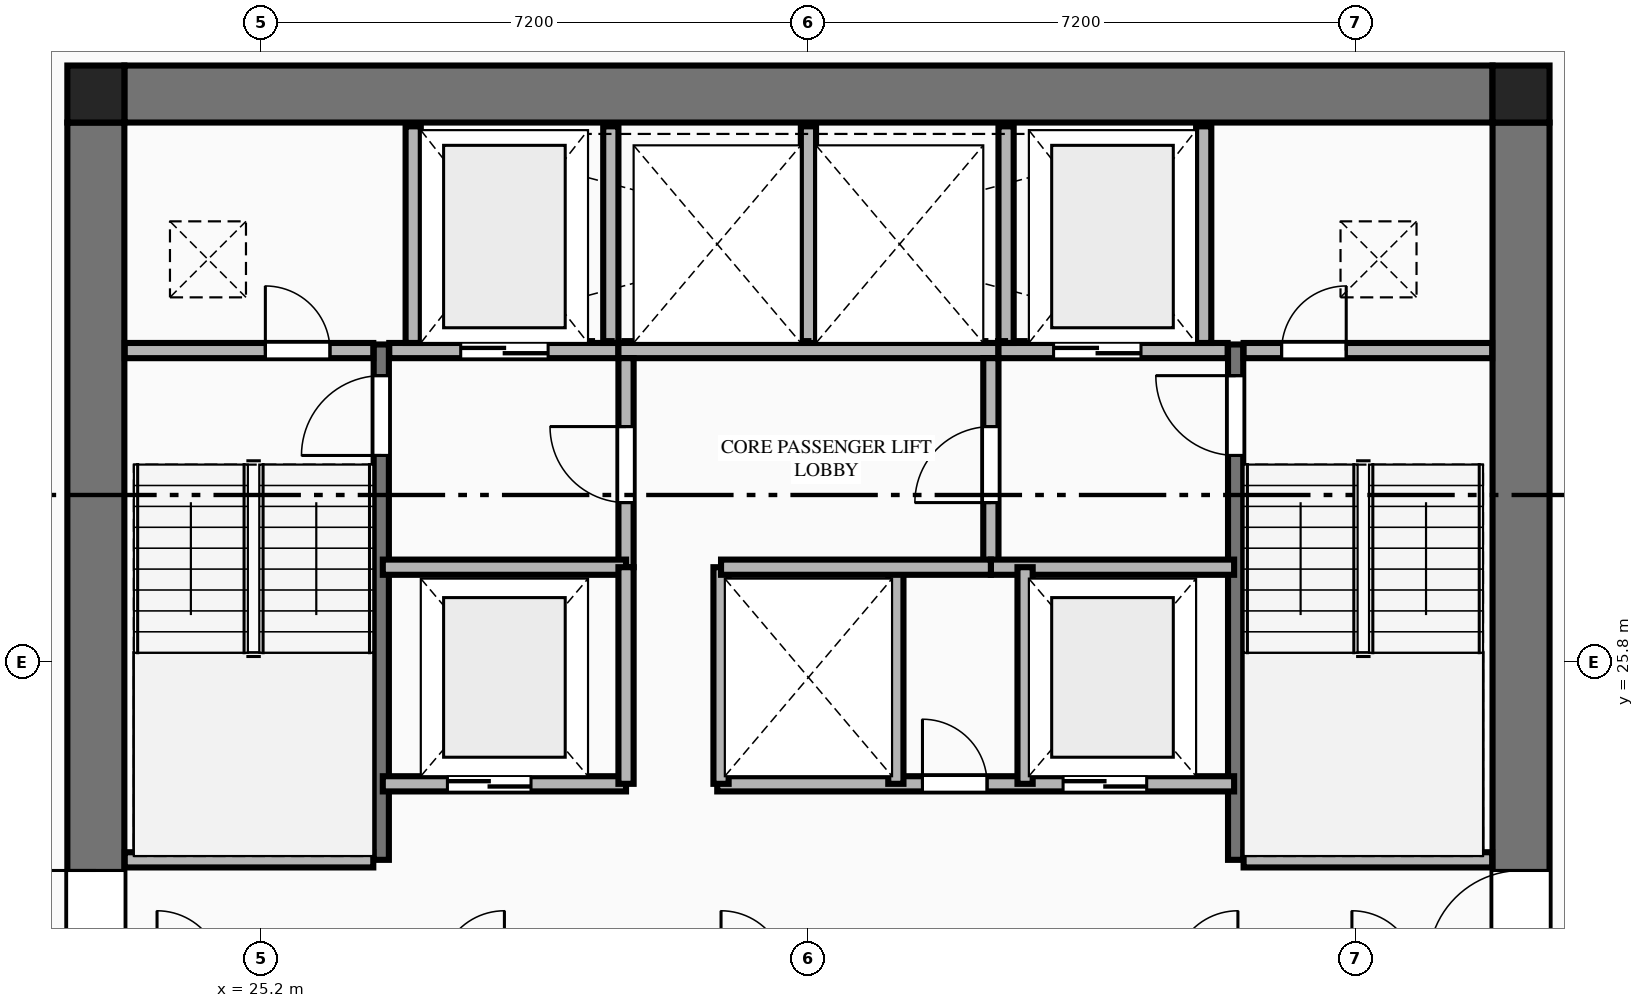
"""IFC4 building model, lengths in metres.
Left out: names, types, materials, properties, quantities, classifications, styles, units other than length and angle.
Written with IfcOpenShell. Run it as: python <this file> out.ifc"""

import sys

from ifc_helpers import new_model, si_unit, direction, frame, frame_2d, origin, origin_2d, place, context, subcontext, project, spatial, rectangle, extrude, element, fill, save


model = new_model("IFC4")
c1 = context("Model", 3, precision=1e-05, world=origin(), true_north=direction((0.0, 1.0)))
c2 = subcontext(c1, "Body", "Model", "MODEL_VIEW")
j1 = project(units=[si_unit("LENGTHUNIT", "METRE"), si_unit("PLANEANGLEUNIT", "RADIAN")], contexts=[c1])
p1 = place(None, origin())
s1 = spatial("IfcSite", under=j1, at=p1, CompositionType="ELEMENT")
p2 = place(p1, origin())
s2 = spatial("IfcBuilding", under=s1, at=p2, CompositionType="ELEMENT")
p3 = place(p2, frame((0.0, 0.0, 141.0)))
s3 = spatial("IfcBuildingStorey", under=s2, at=p3, CompositionType="ELEMENT", Elevation=141.0)
for number, where, z_axis, x_axis in (
    (1, (41.775, 33.275, 0.0), (0.0, 0.0, 1.0), (1.0, 0.0, 0.0)),
    (2, (23.025, 33.275, 0.0), (0.0, 0.0, 1.0), (1.0, 0.0, 0.0)),
):
    element("IfcColumn", number, at=place(p3, frame(where, z_axis=z_axis, x_axis=x_axis)), inside=s3, PredefinedType="COLUMN", context=c2, shape_type="SweptSolid", body=[
        extrude(rectangle(XDim=0.75, YDim=0.75, at=origin_2d()), origin(), (0.0, 0.0, 1.0), 3.55),
    ])
p4 = place(p3, frame((23.4, 33.275, 0.0), z_axis=(0.0, 0.0, 1.0), x_axis=(1.0, 0.0, 0.0)))
e3 = element("IfcWall", 3, at=p4, inside=s3, PredefinedType="SHEAR", context=c2, shape_type="SweptSolid", body=[
    extrude(rectangle(XDim=18.0, YDim=0.75, at=frame_2d((9.0, 0.0))), origin(), (0.0, 0.0, 1.0), 3.34),
])
p5 = place(p3, frame((23.025, 18.9, 0.0), z_axis=(0.0, 0.0, 1.0), x_axis=(0.0, 1.0, 0.0)))
e4 = element("IfcWall", 4, at=p5, inside=s3, PredefinedType="SHEAR", context=c2, shape_type="SweptSolid", body=[
    extrude(rectangle(XDim=14.0, YDim=0.75, at=frame_2d((7.0, 0.0))), origin(), (0.0, 0.0, 1.0), 3.34),
])
p6 = place(p5, frame((2.94, 0.0, 0.0)))
e5 = element("IfcOpeningElement", 5, at=p6, cuts=e4, PredefinedType="OPENING", context=c2, shape_type="SweptSolid", body=[
    extrude(rectangle(XDim=1.22, YDim=2.25, at=frame_2d((0.61, 1.125))), frame((0.0, 0.385, 0.0), z_axis=(0.0, -1.0, 0.0), x_axis=(1.0, 0.0, 0.0)), (0.0, 0.0, 1.0), 0.77),
])
p7 = place(p3, frame((41.775, 18.9, 0.0), z_axis=(0.0, 0.0, 1.0), x_axis=(0.0, 1.0, 0.0)))
e6 = element("IfcWall", 6, at=p7, inside=s3, PredefinedType="SHEAR", context=c2, shape_type="SweptSolid", body=[
    extrude(rectangle(XDim=14.0, YDim=0.75, at=frame_2d((7.0, 0.0))), origin(), (0.0, 0.0, 1.0), 3.34),
])
p8 = place(p7, frame((2.94, 0.0, 0.0)))
e7 = element("IfcOpeningElement", 7, at=p8, cuts=e6, PredefinedType="OPENING", context=c2, shape_type="SweptSolid", body=[
    extrude(rectangle(XDim=1.22, YDim=2.25, at=frame_2d((0.61, 1.125))), frame((0.0, 0.385, 0.0), z_axis=(0.0, -1.0, 0.0), x_axis=(1.0, 0.0, 0.0)), (0.0, 0.0, 1.0), 0.77),
])
p9 = place(p3, frame((26.78, 23.2, 0.0), z_axis=(0.0, 0.0, 1.0), x_axis=(0.0, 1.0, 0.0)))
e8 = element("IfcWall", 8, at=p9, inside=s3, PredefinedType="SHEAR", context=c2, shape_type="SweptSolid", body=[
    extrude(rectangle(XDim=6.78, YDim=0.2, at=frame_2d((3.39, 0.0))), origin(), (0.0, 0.0, 1.0), 3.55),
])
p10 = place(p9, frame((5.32, 0.0, 0.0)))
e9 = element("IfcOpeningElement", 9, at=p10, cuts=e8, PredefinedType="OPENING", context=c2, shape_type="SweptSolid", body=[
    extrude(rectangle(XDim=1.05, YDim=2.15, at=frame_2d((0.525, 1.075))), frame((0.0, 0.11, 0.0), z_axis=(0.0, -1.0, 0.0), x_axis=(1.0, 0.0, 0.0)), (0.0, 0.0, 1.0), 0.22),
])
p11 = place(p3, frame((23.405, 23.2, 0.0), z_axis=(0.0, 0.0, 1.0), x_axis=(1.0, 0.0, 0.0)))
e10 = element("IfcWall", 10, at=p11, inside=s3, PredefinedType="PLUMBINGWALL", context=c2, shape_type="SweptSolid", body=[
    extrude(rectangle(XDim=3.27, YDim=0.2, at=frame_2d((1.635, 0.0))), origin(), (0.0, 0.0, 1.0), 3.34),
])
p12 = place(p3, frame((38.02, 23.2, 0.0), z_axis=(0.0, 0.0, 1.0), x_axis=(0.0, 1.0, 0.0)))
e11 = element("IfcWall", 11, at=p12, inside=s3, PredefinedType="SHEAR", context=c2, shape_type="SweptSolid", body=[
    extrude(rectangle(XDim=6.78, YDim=0.2, at=frame_2d((3.39, 0.0))), origin(), (0.0, 0.0, 1.0), 3.55),
])
p13 = place(p12, frame((5.32, 0.0, 0.0)))
e12 = element("IfcOpeningElement", 12, at=p13, cuts=e11, PredefinedType="OPENING", context=c2, shape_type="SweptSolid", body=[
    extrude(rectangle(XDim=1.05, YDim=2.15, at=frame_2d((0.525, 1.075))), frame((0.0, 0.11, 0.0), z_axis=(0.0, -1.0, 0.0), x_axis=(1.0, 0.0, 0.0)), (0.0, 0.0, 1.0), 0.22),
])
p14 = place(p3, frame((38.125, 23.2, 0.0), z_axis=(0.0, 0.0, 1.0), x_axis=(1.0, 0.0, 0.0)))
e13 = element("IfcWall", 13, at=p14, inside=s3, PredefinedType="PLUMBINGWALL", context=c2, shape_type="SweptSolid", body=[
    extrude(rectangle(XDim=3.27, YDim=0.2, at=frame_2d((1.635, 0.0))), origin(), (0.0, 0.0, 1.0), 3.34),
])
p15 = place(p3, frame((23.405, 29.9, 0.0), z_axis=(0.0, 0.0, 1.0), x_axis=(1.0, 0.0, 0.0)))
e14 = element("IfcWall", 14, at=p15, inside=s3, PredefinedType="PLUMBINGWALL", context=c2, shape_type="SweptSolid", body=[
    extrude(rectangle(XDim=3.27, YDim=0.2, at=frame_2d((1.635, 0.0))), origin(), (0.0, 0.0, 1.0), 3.34),
])
p16 = place(p15, frame((1.85, 0.0, 0.0)))
e15 = element("IfcOpeningElement", 15, at=p16, cuts=e14, PredefinedType="OPENING", context=c2, shape_type="SweptSolid", body=[
    extrude(rectangle(XDim=0.85, YDim=2.05, at=frame_2d((0.425, 1.025))), frame((0.0, 0.11, 0.0), z_axis=(0.0, -1.0, 0.0), x_axis=(1.0, 0.0, 0.0)), (0.0, 0.0, 1.0), 0.22),
])
p17 = place(p3, frame((26.885, 29.9, 0.0), z_axis=(0.0, 0.0, 1.0), x_axis=(1.0, 0.0, 0.0)))
e16 = element("IfcWall", 16, at=p17, inside=s3, PredefinedType="PLUMBINGWALL", context=c2, shape_type="SweptSolid", body=[
    extrude(rectangle(XDim=3.015, YDim=0.2, at=frame_2d((1.507, 0.0))), origin(), (0.0, 0.0, 1.0), 3.34),
])
p18 = place(p17, frame((0.94, 0.0, 0.0)))
e17 = element("IfcOpeningElement", 17, at=p18, cuts=e16, PredefinedType="OPENING", context=c2, shape_type="SweptSolid", body=[
    extrude(rectangle(XDim=1.15, YDim=2.2, at=frame_2d((0.575, 1.1))), frame((0.0, 0.11, 0.0), z_axis=(0.0, -1.0, 0.0), x_axis=(1.0, 0.0, 0.0)), (0.0, 0.0, 1.0), 0.22),
])
p19 = place(p3, frame((29.9, 29.9, 0.0), z_axis=(0.0, 0.0, 1.0), x_axis=(1.0, 0.0, 0.0)))
e18 = element("IfcWall", 18, at=p19, inside=s3, PredefinedType="PLUMBINGWALL", context=c2, shape_type="SweptSolid", body=[
    extrude(rectangle(XDim=5.0, YDim=0.2, at=frame_2d((2.5, 0.0))), origin(), (0.0, 0.0, 1.0), 3.34),
])
p20 = place(p3, frame((34.9, 29.9, 0.0), z_axis=(0.0, 0.0, 1.0), x_axis=(1.0, 0.0, 0.0)))
e19 = element("IfcWall", 19, at=p20, inside=s3, PredefinedType="PLUMBINGWALL", context=c2, shape_type="SweptSolid", body=[
    extrude(rectangle(XDim=3.015, YDim=0.2, at=frame_2d((1.508, 0.0))), origin(), (0.0, 0.0, 1.0), 3.34),
])
p21 = place(p20, frame((0.725, 0.0, 0.0)))
e20 = element("IfcOpeningElement", 20, at=p21, cuts=e19, PredefinedType="OPENING", context=c2, shape_type="SweptSolid", body=[
    extrude(rectangle(XDim=1.15, YDim=2.2, at=frame_2d((0.575, 1.1))), frame((0.0, 0.11, 0.0), z_axis=(0.0, -1.0, 0.0), x_axis=(1.0, 0.0, 0.0)), (0.0, 0.0, 1.0), 0.22),
])
p22 = place(p3, frame((38.125, 29.9, 0.0), z_axis=(0.0, 0.0, 1.0), x_axis=(1.0, 0.0, 0.0)))
e21 = element("IfcWall", 21, at=p22, inside=s3, PredefinedType="PLUMBINGWALL", context=c2, shape_type="SweptSolid", body=[
    extrude(rectangle(XDim=3.27, YDim=0.2, at=frame_2d((1.635, 0.0))), origin(), (0.0, 0.0, 1.0), 3.34),
])
p23 = place(p22, frame((0.5, 0.0, 0.0)))
e22 = element("IfcOpeningElement", 22, at=p23, cuts=e21, PredefinedType="OPENING", context=c2, shape_type="SweptSolid", body=[
    extrude(rectangle(XDim=0.85, YDim=2.05, at=frame_2d((0.425, 1.025))), frame((0.0, 0.11, 0.0), z_axis=(0.0, -1.0, 0.0), x_axis=(1.0, 0.0, 0.0)), (0.0, 0.0, 1.0), 0.22),
])
for number, where, z_axis, x_axis in (
    (23, (27.2, 30.0, 0.0), (0.0, 0.0, 1.0), (0.0, 1.0, 0.0)),
    (24, (29.8, 30.0, 0.0), (0.0, 0.0, 1.0), (0.0, 1.0, 0.0)),
    (25, (32.4, 30.0, 0.0), (0.0, 0.0, 1.0), (0.0, 1.0, 0.0)),
    (26, (35.0, 30.0, 0.0), (0.0, 0.0, 1.0), (0.0, 1.0, 0.0)),
    (27, (37.6, 30.0, 0.0), (0.0, 0.0, 1.0), (0.0, 1.0, 0.0)),
):
    element("IfcWall", number, at=place(p3, frame(where, z_axis=z_axis, x_axis=x_axis)), inside=s3, PredefinedType="PLUMBINGWALL", context=c2, shape_type="SweptSolid", body=[
        extrude(rectangle(XDim=2.85, YDim=0.2, at=frame_2d((1.425, 0.0))), origin(), (0.0, 0.0, 1.0), 3.34),
    ])
p24 = place(p3, frame((30.0, 27.05, 0.0), z_axis=(0.0, 0.0, 1.0), x_axis=(0.0, 1.0, 0.0)))
e28 = element("IfcWall", 28, at=p24, inside=s3, PredefinedType="PLUMBINGWALL", context=c2, shape_type="SweptSolid", body=[
    extrude(rectangle(XDim=2.75, YDim=0.2, at=frame_2d((1.375, 0.0))), origin(), (0.0, 0.0, 1.0), 3.34),
])
p25 = place(p24, frame((0.85, 0.0, 0.0)))
e29 = element("IfcOpeningElement", 29, at=p25, cuts=e28, PredefinedType="OPENING", context=c2, shape_type="SweptSolid", body=[
    extrude(rectangle(XDim=1.0, YDim=2.15, at=frame_2d((0.5, 1.075))), frame((0.0, 0.11, 0.0), z_axis=(0.0, -1.0, 0.0), x_axis=(1.0, 0.0, 0.0)), (0.0, 0.0, 1.0), 0.22),
])
p26 = place(p3, frame((26.8, 27.05, 0.0), z_axis=(0.0, 0.0, 1.0), x_axis=(1.0, 0.0, 0.0)))
e30 = element("IfcWall", 30, at=p26, inside=s3, PredefinedType="PLUMBINGWALL", context=c2, shape_type="SweptSolid", body=[
    extrude(rectangle(XDim=3.2, YDim=0.2, at=frame_2d((1.6, 0.0))), origin(), (0.0, 0.0, 1.0), 3.34),
])
p27 = place(p3, frame((34.8, 27.05, 0.0), z_axis=(0.0, 0.0, 1.0), x_axis=(0.0, 1.0, 0.0)))
e31 = element("IfcWall", 31, at=p27, inside=s3, PredefinedType="PLUMBINGWALL", context=c2, shape_type="SweptSolid", body=[
    extrude(rectangle(XDim=2.75, YDim=0.2, at=frame_2d((1.375, 0.0))), origin(), (0.0, 0.0, 1.0), 3.34),
])
p28 = place(p27, frame((0.85, 0.0, 0.0)))
e32 = element("IfcOpeningElement", 32, at=p28, cuts=e31, PredefinedType="OPENING", context=c2, shape_type="SweptSolid", body=[
    extrude(rectangle(XDim=1.0, YDim=2.15, at=frame_2d((0.5, 1.075))), frame((0.0, 0.11, 0.0), z_axis=(0.0, -1.0, 0.0), x_axis=(1.0, 0.0, 0.0)), (0.0, 0.0, 1.0), 0.22),
])
p29 = place(p3, frame((34.8, 27.05, 0.0), z_axis=(0.0, 0.0, 1.0), x_axis=(1.0, 0.0, 0.0)))
e33 = element("IfcWall", 33, at=p29, inside=s3, PredefinedType="PLUMBINGWALL", context=c2, shape_type="SweptSolid", body=[
    extrude(rectangle(XDim=3.2, YDim=0.2, at=frame_2d((1.6, 0.0))), origin(), (0.0, 0.0, 1.0), 3.34),
])
p30 = place(p3, frame((26.8, 24.2, 0.0), z_axis=(0.0, 0.0, 1.0), x_axis=(1.0, 0.0, 0.0)))
e34 = element("IfcWall", 34, at=p30, inside=s3, PredefinedType="PLUMBINGWALL", context=c2, shape_type="SweptSolid", body=[
    extrude(rectangle(XDim=3.2, YDim=0.2, at=frame_2d((1.6, 0.0))), origin(), (0.0, 0.0, 1.0), 3.34),
])
p31 = place(p30, frame((0.85, 0.0, 0.0)))
e35 = element("IfcOpeningElement", 35, at=p31, cuts=e34, PredefinedType="OPENING", context=c2, shape_type="SweptSolid", body=[
    extrude(rectangle(XDim=1.1, YDim=2.2, at=frame_2d((0.55, 1.1))), frame((0.0, 0.11, 0.0), z_axis=(0.0, -1.0, 0.0), x_axis=(1.0, 0.0, 0.0)), (0.0, 0.0, 1.0), 0.22),
])
p32 = place(p3, frame((30.0, 24.2, 0.0), z_axis=(0.0, 0.0, 1.0), x_axis=(0.0, 1.0, 0.0)))
e36 = element("IfcWall", 36, at=p32, inside=s3, PredefinedType="PLUMBINGWALL", context=c2, shape_type="SweptSolid", body=[
    extrude(rectangle(XDim=2.85, YDim=0.2, at=frame_2d((1.425, 0.0))), origin(), (0.0, 0.0, 1.0), 3.34),
])
p33 = place(p3, frame((31.2, 24.2, 0.0), z_axis=(0.0, 0.0, 1.0), x_axis=(1.0, 0.0, 0.0)))
e37 = element("IfcWall", 37, at=p33, inside=s3, PredefinedType="PLUMBINGWALL", context=c2, shape_type="SweptSolid", body=[
    extrude(rectangle(XDim=6.8, YDim=0.2, at=frame_2d((3.4, 0.0))), origin(), (0.0, 0.0, 1.0), 3.34),
])
p34 = place(p33, frame((2.7, 0.0, 0.0)))
e38 = element("IfcOpeningElement", 38, at=p34, cuts=e37, PredefinedType="OPENING", context=c2, shape_type="SweptSolid", body=[
    extrude(rectangle(XDim=0.85, YDim=2.05, at=frame_2d((0.425, 1.025))), frame((0.0, 0.11, 0.0), z_axis=(0.0, -1.0, 0.0), x_axis=(1.0, 0.0, 0.0)), (0.0, 0.0, 1.0), 0.22),
])
p35 = place(p33, frame((4.55, 0.0, 0.0)))
e39 = element("IfcOpeningElement", 39, at=p35, cuts=e37, PredefinedType="OPENING", context=c2, shape_type="SweptSolid", body=[
    extrude(rectangle(XDim=1.1, YDim=2.2, at=frame_2d((0.55, 1.1))), frame((0.0, 0.11, 0.0), z_axis=(0.0, -1.0, 0.0), x_axis=(1.0, 0.0, 0.0)), (0.0, 0.0, 1.0), 0.22),
])
for number, where, z_axis, x_axis in (
    (40, (31.25, 24.2, 0.0), (0.0, 0.0, 1.0), (0.0, 1.0, 0.0)),
    (41, (33.55, 24.2, 0.0), (0.0, 0.0, 1.0), (0.0, 1.0, 0.0)),
    (42, (35.25, 24.2, 0.0), (0.0, 0.0, 1.0), (0.0, 1.0, 0.0)),
):
    element("IfcWall", number, at=place(p3, frame(where, z_axis=z_axis, x_axis=x_axis)), inside=s3, PredefinedType="PLUMBINGWALL", context=c2, shape_type="SweptSolid", body=[
        extrude(rectangle(XDim=2.85, YDim=0.2, at=frame_2d((1.425, 0.0))), origin(), (0.0, 0.0, 1.0), 3.34),
    ])
p36 = place(p3, frame((31.25, 27.05, 0.0), z_axis=(0.0, 0.0, 1.0), x_axis=(1.0, 0.0, 0.0)))
e43 = element("IfcWall", 43, at=p36, inside=s3, PredefinedType="PLUMBINGWALL", context=c2, shape_type="SweptSolid", body=[
    extrude(rectangle(XDim=3.55, YDim=0.2, at=frame_2d((1.775, 0.0))), origin(), (0.0, 0.0, 1.0), 3.34),
])
p37 = place(p6, origin())
e44 = element("IfcDoor", 44, at=p37, inside=s3, OperationType="SINGLE_SWING_RIGHT", PredefinedType="DOOR", context=c2, shape_type="SweptSolid", body=[
    extrude(rectangle(XDim=1.22, YDim=2.25, at=frame_2d((0.61, 1.125))), frame((0.0, 0.025, 0.0), z_axis=(0.0, -1.0, 0.0), x_axis=(1.0, 0.0, 0.0)), (0.0, 0.0, 1.0), 0.05),
])
fill(e5, e44)
p38 = place(p8, origin())
e45 = element("IfcDoor", 45, at=p38, inside=s3, OperationType="SINGLE_SWING_LEFT", PredefinedType="DOOR", context=c2, shape_type="SweptSolid", body=[
    extrude(rectangle(XDim=1.22, YDim=2.25, at=frame_2d((0.61, 1.125))), frame((0.0, 0.025, 0.0), z_axis=(0.0, -1.0, 0.0), x_axis=(1.0, 0.0, 0.0)), (0.0, 0.0, 1.0), 0.05),
])
fill(e7, e45)
p39 = place(p10, origin())
e46 = element("IfcDoor", 46, at=p39, inside=s3, OperationType="SINGLE_SWING_LEFT", PredefinedType="DOOR", context=c2, shape_type="SweptSolid", body=[
    extrude(rectangle(XDim=1.05, YDim=2.15, at=frame_2d((0.525, 1.075))), frame((0.0, 0.025, 0.0), z_axis=(0.0, -1.0, 0.0), x_axis=(1.0, 0.0, 0.0)), (0.0, 0.0, 1.0), 0.05),
])
fill(e9, e46)
p40 = place(p13, origin())
e47 = element("IfcDoor", 47, at=p40, inside=s3, OperationType="SINGLE_SWING_RIGHT", PredefinedType="DOOR", context=c2, shape_type="SweptSolid", body=[
    extrude(rectangle(XDim=1.05, YDim=2.15, at=frame_2d((0.525, 1.075))), frame((0.0, 0.025, 0.0), z_axis=(0.0, -1.0, 0.0), x_axis=(1.0, 0.0, 0.0)), (0.0, 0.0, 1.0), 0.05),
])
fill(e12, e47)
p41 = place(p16, origin())
e48 = element("IfcDoor", 48, at=p41, inside=s3, OperationType="SINGLE_SWING_LEFT", PredefinedType="DOOR", context=c2, shape_type="SweptSolid", body=[
    extrude(rectangle(XDim=0.85, YDim=2.05, at=frame_2d((0.425, 1.025))), frame((0.0, 0.025, 0.0), z_axis=(0.0, -1.0, 0.0), x_axis=(1.0, 0.0, 0.0)), (0.0, 0.0, 1.0), 0.05),
])
fill(e15, e48)
p42 = place(p23, origin())
e49 = element("IfcDoor", 49, at=p42, inside=s3, OperationType="SINGLE_SWING_RIGHT", PredefinedType="DOOR", context=c2, shape_type="SweptSolid", body=[
    extrude(rectangle(XDim=0.85, YDim=2.05, at=frame_2d((0.425, 1.025))), frame((0.0, 0.025, 0.0), z_axis=(0.0, -1.0, 0.0), x_axis=(1.0, 0.0, 0.0)), (0.0, 0.0, 1.0), 0.05),
])
fill(e22, e49)
p43 = place(p18, origin())
e50 = element("IfcDoor", 50, at=p43, inside=s3, OperationType="DOUBLE_DOOR_SLIDING", PredefinedType="DOOR", context=c2, shape_type="SweptSolid", body=[
    extrude(rectangle(XDim=1.15, YDim=2.2, at=frame_2d((0.575, 1.1))), frame((0.0, 0.025, 0.0), z_axis=(0.0, -1.0, 0.0), x_axis=(1.0, 0.0, 0.0)), (0.0, 0.0, 1.0), 0.05),
])
fill(e17, e50)
p44 = place(p21, origin())
e51 = element("IfcDoor", 51, at=p44, inside=s3, OperationType="DOUBLE_DOOR_SLIDING", PredefinedType="DOOR", context=c2, shape_type="SweptSolid", body=[
    extrude(rectangle(XDim=1.15, YDim=2.2, at=frame_2d((0.575, 1.1))), frame((0.0, 0.025, 0.0), z_axis=(0.0, -1.0, 0.0), x_axis=(1.0, 0.0, 0.0)), (0.0, 0.0, 1.0), 0.05),
])
fill(e20, e51)
p45 = place(p25, origin())
e52 = element("IfcDoor", 52, at=p45, inside=s3, OperationType="SINGLE_SWING_RIGHT", PredefinedType="DOOR", context=c2, shape_type="SweptSolid", body=[
    extrude(rectangle(XDim=1.0, YDim=2.15, at=frame_2d((0.5, 1.075))), frame((0.0, 0.025, 0.0), z_axis=(0.0, -1.0, 0.0), x_axis=(1.0, 0.0, 0.0)), (0.0, 0.0, 1.0), 0.05),
])
fill(e29, e52)
p46 = place(p28, origin())
e53 = element("IfcDoor", 53, at=p46, inside=s3, OperationType="SINGLE_SWING_LEFT", PredefinedType="DOOR", context=c2, shape_type="SweptSolid", body=[
    extrude(rectangle(XDim=1.0, YDim=2.15, at=frame_2d((0.5, 1.075))), frame((0.0, 0.025, 0.0), z_axis=(0.0, -1.0, 0.0), x_axis=(1.0, 0.0, 0.0)), (0.0, 0.0, 1.0), 0.05),
])
fill(e32, e53)
p47 = place(p31, origin())
e54 = element("IfcDoor", 54, at=p47, inside=s3, OperationType="DOUBLE_DOOR_SLIDING", PredefinedType="DOOR", context=c2, shape_type="SweptSolid", body=[
    extrude(rectangle(XDim=1.1, YDim=2.2, at=frame_2d((0.55, 1.1))), frame((0.0, 0.025, 0.0), z_axis=(0.0, -1.0, 0.0), x_axis=(1.0, 0.0, 0.0)), (0.0, 0.0, 1.0), 0.05),
])
fill(e35, e54)
p48 = place(p34, origin())
e55 = element("IfcDoor", 55, at=p48, inside=s3, OperationType="SINGLE_SWING_LEFT", PredefinedType="DOOR", context=c2, shape_type="SweptSolid", body=[
    extrude(rectangle(XDim=0.85, YDim=2.05, at=frame_2d((0.425, 1.025))), frame((0.0, 0.025, 0.0), z_axis=(0.0, -1.0, 0.0), x_axis=(1.0, 0.0, 0.0)), (0.0, 0.0, 1.0), 0.05),
])
fill(e38, e55)
p49 = place(p35, origin())
e56 = element("IfcDoor", 56, at=p49, inside=s3, OperationType="DOUBLE_DOOR_SLIDING", PredefinedType="DOOR", context=c2, shape_type="SweptSolid", body=[
    extrude(rectangle(XDim=1.1, YDim=2.2, at=frame_2d((0.55, 1.1))), frame((0.0, 0.025, 0.0), z_axis=(0.0, -1.0, 0.0), x_axis=(1.0, 0.0, 0.0)), (0.0, 0.0, 1.0), 0.05),
])
fill(e39, e56)
save(model, sys.argv[1])
